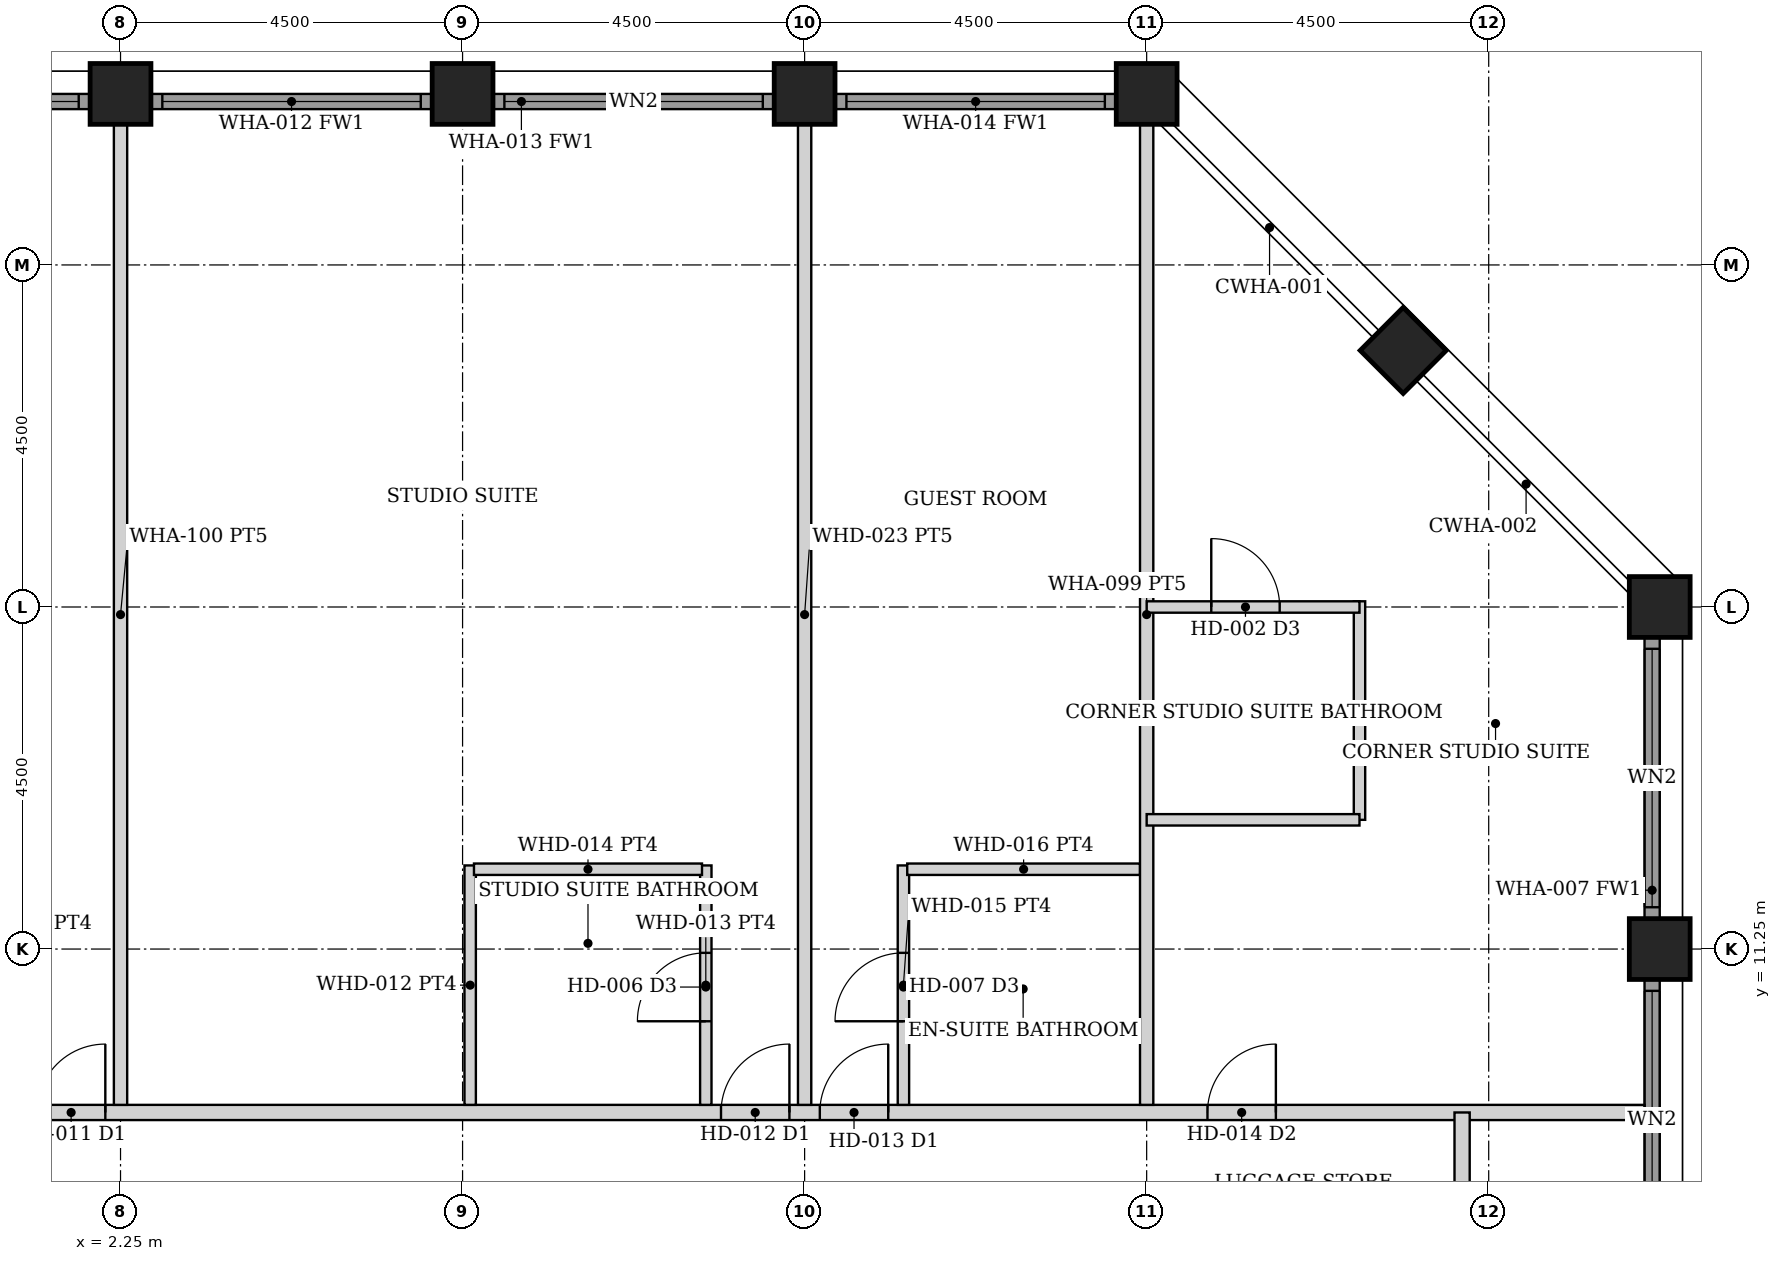
"""IFC4 building model, lengths in metres.
Left out: names, types, materials, properties, quantities, classifications, styles, units other than length and angle.
Written with IfcOpenShell. Run it as: python <this file> out.ifc"""

import sys

from ifc_helpers import new_model, si_unit, direction, frame, frame_2d, origin, origin_2d, place, context, subcontext, project, spatial, rectangle, hollow_rectangle, extrude, element, fill, save


model = new_model("IFC4")
c1 = context("Model", 3, precision=1e-05, world=origin(), true_north=direction((0.0, 1.0)))
c2 = subcontext(c1, "Body", "Model", "MODEL_VIEW")
j1 = project(units=[si_unit("LENGTHUNIT", "METRE"), si_unit("PLANEANGLEUNIT", "RADIAN")], contexts=[c1])
p1 = place(None, origin())
s1 = spatial("IfcSite", under=j1, at=p1, CompositionType="ELEMENT")
p2 = place(p1, origin())
s2 = spatial("IfcBuilding", under=s1, at=p2, CompositionType="ELEMENT")
p3 = place(p2, frame((0.0, 0.0, 150.8)))
s3 = spatial("IfcBuildingStorey", under=s2, at=p3, CompositionType="ELEMENT", Elevation=150.8)
for number, where, z_axis, x_axis in (
    (1, (2.25, 22.5, 0.0), (0.0, 0.0, 1.0), (0.0, 1.0, 0.0)),
    (2, (6.75, 22.5, 0.0), (0.0, 0.0, 1.0), (0.0, 1.0, 0.0)),
    (3, (11.25, 22.5, 0.0), (0.0, 0.0, 1.0), (0.0, 1.0, 0.0)),
    (4, (22.5, 11.25, 0.0), (0.0, 0.0, 1.0), (1.0, 0.0, 0.0)),
    (5, (15.75, 22.5, 0.0), (0.0, 0.0, 1.0), (0.0, 1.0, 0.0)),
    (6, (22.5, 15.75, 0.0), (0.0, 0.0, 1.0), (1.0, 0.0, 0.0)),
    (7, (19.125, 19.125, 0.0), (0.0, 0.0, 1.0), (0.707, 0.707, 0.0)),
):
    element("IfcColumn", number, at=place(p3, frame(where, z_axis=z_axis, x_axis=x_axis)), inside=s3, PredefinedType="COLUMN", context=c2, shape_type="SweptSolid", body=[
        extrude(hollow_rectangle(XDim=0.8, YDim=0.8, WallThickness=0.05, at=origin_2d()), origin(), (0.0, 0.0, 1.0), 3.6),
    ])
p4 = place(p3, frame((22.4, 7.155, 0.0), z_axis=(0.0, 0.0, 1.0), x_axis=(0.0, 1.0, 0.0)))
e8 = element("IfcWall", 8, at=p4, inside=s3, PredefinedType="SOLIDWALL", context=c2, shape_type="SweptSolid", body=[
    extrude(rectangle(XDim=3.69, YDim=0.2, at=frame_2d((1.845, 0.0))), origin(), (0.0, 0.0, 1.0), 2.479),
])
p5 = place(p4, frame((0.145, 0.0, 0.3)))
e9 = element("IfcOpeningElement", 9, at=p5, cuts=e8, PredefinedType="OPENING", context=c2, shape_type="SweptSolid", body=[
    extrude(rectangle(XDim=3.4, YDim=2.029, at=frame_2d((1.7, 1.015))), frame((0.0, 0.11, 0.0), z_axis=(0.0, -1.0, 0.0), x_axis=(1.0, 0.0, 0.0)), (0.0, 0.0, 1.0), 0.22),
])
p6 = place(p3, frame((22.4, 11.655, 0.0), z_axis=(0.0, 0.0, 1.0), x_axis=(0.0, 1.0, 0.0)))
e10 = element("IfcWall", 10, at=p6, inside=s3, PredefinedType="SOLIDWALL", context=c2, shape_type="SweptSolid", body=[
    extrude(rectangle(XDim=3.69, YDim=0.2, at=frame_2d((1.845, 0.0))), origin(), (0.0, 0.0, 1.0), 2.479),
])
p7 = place(p6, frame((0.145, 0.0, 0.3)))
e11 = element("IfcOpeningElement", 11, at=p7, cuts=e10, PredefinedType="OPENING", context=c2, shape_type="SweptSolid", body=[
    extrude(rectangle(XDim=3.4, YDim=2.029, at=frame_2d((1.7, 1.015))), frame((0.0, 0.11, 0.0), z_axis=(0.0, -1.0, 0.0), x_axis=(1.0, 0.0, 0.0)), (0.0, 0.0, 1.0), 0.22),
])
p8 = place(p3, frame((-1.845, 22.4, 0.0), z_axis=(0.0, 0.0, 1.0), x_axis=(1.0, 0.0, 0.0)))
e12 = element("IfcWall", 12, at=p8, inside=s3, PredefinedType="SOLIDWALL", context=c2, shape_type="SweptSolid", body=[
    extrude(rectangle(XDim=3.69, YDim=0.2, at=frame_2d((1.845, 0.0))), origin(), (0.0, 0.0, 1.0), 2.479),
])
p9 = place(p8, frame((0.145, 0.0, 0.3)))
e13 = element("IfcOpeningElement", 13, at=p9, cuts=e12, PredefinedType="OPENING", context=c2, shape_type="SweptSolid", body=[
    extrude(rectangle(XDim=3.4, YDim=2.029, at=frame_2d((1.7, 1.015))), frame((0.0, 0.11, 0.0), z_axis=(0.0, -1.0, 0.0), x_axis=(1.0, 0.0, 0.0)), (0.0, 0.0, 1.0), 0.22),
])
p10 = place(p3, frame((2.655, 22.4, 0.0), z_axis=(0.0, 0.0, 1.0), x_axis=(1.0, 0.0, 0.0)))
e14 = element("IfcWall", 14, at=p10, inside=s3, PredefinedType="SOLIDWALL", context=c2, shape_type="SweptSolid", body=[
    extrude(rectangle(XDim=3.69, YDim=0.2, at=frame_2d((1.845, 0.0))), origin(), (0.0, 0.0, 1.0), 2.479),
])
p11 = place(p10, frame((0.145, 0.0, 0.3)))
e15 = element("IfcOpeningElement", 15, at=p11, cuts=e14, PredefinedType="OPENING", context=c2, shape_type="SweptSolid", body=[
    extrude(rectangle(XDim=3.4, YDim=2.029, at=frame_2d((1.7, 1.015))), frame((0.0, 0.11, 0.0), z_axis=(0.0, -1.0, 0.0), x_axis=(1.0, 0.0, 0.0)), (0.0, 0.0, 1.0), 0.22),
])
p12 = place(p3, frame((7.155, 22.4, 0.0), z_axis=(0.0, 0.0, 1.0), x_axis=(1.0, 0.0, 0.0)))
e16 = element("IfcWall", 16, at=p12, inside=s3, PredefinedType="SOLIDWALL", context=c2, shape_type="SweptSolid", body=[
    extrude(rectangle(XDim=3.69, YDim=0.2, at=frame_2d((1.845, 0.0))), origin(), (0.0, 0.0, 1.0), 2.479),
])
p13 = place(p12, frame((0.145, 0.0, 0.3)))
e17 = element("IfcOpeningElement", 17, at=p13, cuts=e16, PredefinedType="OPENING", context=c2, shape_type="SweptSolid", body=[
    extrude(rectangle(XDim=3.4, YDim=2.029, at=frame_2d((1.7, 1.015))), frame((0.0, 0.11, 0.0), z_axis=(0.0, -1.0, 0.0), x_axis=(1.0, 0.0, 0.0)), (0.0, 0.0, 1.0), 0.22),
])
p14 = place(p3, frame((11.655, 22.4, 0.0), z_axis=(0.0, 0.0, 1.0), x_axis=(1.0, 0.0, 0.0)))
e18 = element("IfcWall", 18, at=p14, inside=s3, PredefinedType="SOLIDWALL", context=c2, shape_type="SweptSolid", body=[
    extrude(rectangle(XDim=3.69, YDim=0.2, at=frame_2d((1.845, 0.0))), origin(), (0.0, 0.0, 1.0), 2.479),
])
p15 = place(p14, frame((0.145, 0.0, 0.3)))
e19 = element("IfcOpeningElement", 19, at=p15, cuts=e18, PredefinedType="OPENING", context=c2, shape_type="SweptSolid", body=[
    extrude(rectangle(XDim=3.4, YDim=2.029, at=frame_2d((1.7, 1.015))), frame((0.0, 0.11, 0.0), z_axis=(0.0, -1.0, 0.0), x_axis=(1.0, 0.0, 0.0)), (0.0, 0.0, 1.0), 0.22),
])
p16 = place(p3, frame((-22.3, 9.1, 0.0), z_axis=(0.0, 0.0, 1.0), x_axis=(1.0, 0.0, 0.0)))
e20 = element("IfcWall", 20, at=p16, inside=s3, PredefinedType="PARTITIONING", context=c2, shape_type="SweptSolid", body=[
    extrude(rectangle(XDim=44.6, YDim=0.2, at=frame_2d((22.3, 0.0))), origin(), (0.0, 0.0, 1.0), 2.473),
])
p17 = place(p16, frame((6.75, 0.0, 0.0)))
e21 = element("IfcOpeningElement", 21, at=p17, cuts=e20, PredefinedType="OPENING", context=c2, shape_type="SweptSolid", body=[
    extrude(rectangle(XDim=0.9, YDim=2.1, at=frame_2d((0.45, 1.05))), frame((0.0, 0.11, 0.0), z_axis=(0.0, -1.0, 0.0), x_axis=(1.0, 0.0, 0.0)), (0.0, 0.0, 1.0), 0.22),
])
p18 = place(p16, frame((11.25, 0.0, 0.0)))
e22 = element("IfcOpeningElement", 22, at=p18, cuts=e20, PredefinedType="OPENING", context=c2, shape_type="SweptSolid", body=[
    extrude(rectangle(XDim=0.9, YDim=2.1, at=frame_2d((0.45, 1.05))), frame((0.0, 0.11, 0.0), z_axis=(0.0, -1.0, 0.0), x_axis=(1.0, 0.0, 0.0)), (0.0, 0.0, 1.0), 0.22),
])
p19 = place(p16, frame((23.45, 0.0, 0.0)))
e23 = element("IfcOpeningElement", 23, at=p19, cuts=e20, PredefinedType="OPENING", context=c2, shape_type="SweptSolid", body=[
    extrude(rectangle(XDim=0.9, YDim=2.1, at=frame_2d((0.45, 1.05))), frame((0.0, 0.11, 0.0), z_axis=(0.0, -1.0, 0.0), x_axis=(1.0, 0.0, 0.0)), (0.0, 0.0, 1.0), 0.22),
])
p20 = place(p16, frame((32.45, 0.0, 0.0)))
e24 = element("IfcOpeningElement", 24, at=p20, cuts=e20, PredefinedType="OPENING", context=c2, shape_type="SweptSolid", body=[
    extrude(rectangle(XDim=0.9, YDim=2.1, at=frame_2d((0.45, 1.05))), frame((0.0, 0.11, 0.0), z_axis=(0.0, -1.0, 0.0), x_axis=(1.0, 0.0, 0.0)), (0.0, 0.0, 1.0), 0.22),
])
p21 = place(p16, frame((33.75, 0.0, 0.0)))
e25 = element("IfcOpeningElement", 25, at=p21, cuts=e20, PredefinedType="OPENING", context=c2, shape_type="SweptSolid", body=[
    extrude(rectangle(XDim=0.9, YDim=2.1, at=frame_2d((0.45, 1.05))), frame((0.0, 0.11, 0.0), z_axis=(0.0, -1.0, 0.0), x_axis=(1.0, 0.0, 0.0)), (0.0, 0.0, 1.0), 0.22),
])
p22 = place(p16, frame((38.85, 0.0, 0.0)))
e26 = element("IfcOpeningElement", 26, at=p22, cuts=e20, PredefinedType="OPENING", context=c2, shape_type="SweptSolid", body=[
    extrude(rectangle(XDim=0.9, YDim=2.1, at=frame_2d((0.45, 1.05))), frame((0.0, 0.11, 0.0), z_axis=(0.0, -1.0, 0.0), x_axis=(1.0, 0.0, 0.0)), (0.0, 0.0, 1.0), 0.22),
])
p23 = place(p16, frame((4.85, 0.0, 0.0)))
e27 = element("IfcOpeningElement", 27, at=p23, cuts=e20, PredefinedType="OPENING", context=c2, shape_type="SweptSolid", body=[
    extrude(rectangle(XDim=0.9, YDim=2.1, at=frame_2d((0.45, 1.05))), frame((0.0, 0.11, 0.0), z_axis=(0.0, -1.0, 0.0), x_axis=(1.0, 0.0, 0.0)), (0.0, 0.0, 1.0), 0.22),
])
p24 = place(p3, frame((19.9, 2.2, 0.0), z_axis=(0.0, 0.0, 1.0), x_axis=(0.0, 1.0, 0.0)))
e28 = element("IfcWall", 28, at=p24, inside=s3, PredefinedType="PARTITIONING", context=c2, shape_type="SweptSolid", body=[
    extrude(rectangle(XDim=6.9, YDim=0.2, at=frame_2d((3.45, 0.0))), origin(), (0.0, 0.0, 1.0), 2.473),
])
p25 = place(p24, frame((2.925, 0.0, 0.0)))
e29 = element("IfcOpeningElement", 29, at=p25, cuts=e28, PredefinedType="OPENING", context=c2, shape_type="SweptSolid", body=[
    extrude(rectangle(XDim=1.0, YDim=2.1, at=frame_2d((0.5, 1.05))), frame((0.0, 0.11, 0.0), z_axis=(0.0, -1.0, 0.0), x_axis=(1.0, 0.0, 0.0)), (0.0, 0.0, 1.0), 0.22),
])
p26 = place(p3, frame((9.95, 9.2, 0.0), z_axis=(0.0, 0.0, 1.0), x_axis=(0.0, 1.0, 0.0)))
e30 = element("IfcWall", 30, at=p26, inside=s3, PredefinedType="PARTITIONING", context=c2, shape_type="SweptSolid", body=[
    extrude(rectangle(XDim=3.15, YDim=0.15, at=frame_2d((1.575, 0.0))), origin(), (0.0, 0.0, 1.0), 2.473),
])
p27 = place(p26, frame((1.1, 0.0, 0.0)))
e31 = element("IfcOpeningElement", 31, at=p27, cuts=e30, PredefinedType="OPENING", context=c2, shape_type="SweptSolid", body=[
    extrude(rectangle(XDim=0.9, YDim=2.1, at=frame_2d((0.45, 1.05))), frame((0.0, 0.085, 0.0), z_axis=(0.0, -1.0, 0.0), x_axis=(1.0, 0.0, 0.0)), (0.0, 0.0, 1.0), 0.17),
])
p28 = place(p3, frame((6.85, 9.2, 0.0), z_axis=(0.0, 0.0, 1.0), x_axis=(0.0, 1.0, 0.0)))
e32 = element("IfcWall", 32, at=p28, inside=s3, PredefinedType="PARTITIONING", context=c2, shape_type="SweptSolid", body=[
    extrude(rectangle(XDim=3.15, YDim=0.15, at=frame_2d((1.575, 0.0))), origin(), (0.0, 0.0, 1.0), 2.473),
])
p29 = place(p3, frame((6.9, 12.3, 0.0), z_axis=(0.0, 0.0, 1.0), x_axis=(1.0, 0.0, 0.0)))
e33 = element("IfcWall", 33, at=p29, inside=s3, PredefinedType="PARTITIONING", context=c2, shape_type="SweptSolid", body=[
    extrude(rectangle(XDim=3.0, YDim=0.15, at=frame_2d((1.5, 0.0))), origin(), (0.0, 0.0, 1.0), 2.473),
])
p30 = place(p3, frame((12.55, 9.2, 0.0), z_axis=(0.0, 0.0, 1.0), x_axis=(0.0, 1.0, 0.0)))
e34 = element("IfcWall", 34, at=p30, inside=s3, PredefinedType="PARTITIONING", context=c2, shape_type="SweptSolid", body=[
    extrude(rectangle(XDim=3.15, YDim=0.15, at=frame_2d((1.575, 0.0))), origin(), (0.0, 0.0, 1.0), 2.473),
])
p31 = place(p30, frame((1.1, 0.0, 0.0)))
e35 = element("IfcOpeningElement", 35, at=p31, cuts=e34, PredefinedType="OPENING", context=c2, shape_type="SweptSolid", body=[
    extrude(rectangle(XDim=0.9, YDim=2.1, at=frame_2d((0.45, 1.05))), frame((0.0, 0.085, 0.0), z_axis=(0.0, -1.0, 0.0), x_axis=(1.0, 0.0, 0.0)), (0.0, 0.0, 1.0), 0.17),
])
p32 = place(p3, frame((12.6, 12.3, 0.0), z_axis=(0.0, 0.0, 1.0), x_axis=(1.0, 0.0, 0.0)))
e36 = element("IfcWall", 36, at=p32, inside=s3, PredefinedType="PARTITIONING", context=c2, shape_type="SweptSolid", body=[
    extrude(rectangle(XDim=3.062, YDim=0.15, at=frame_2d((1.531, 0.0))), origin(), (0.0, 0.0, 1.0), 2.473),
])
for number, where, z_axis, x_axis in (
    (37, (2.25, 9.2, 0.0), (0.0, 0.0, 1.0), (0.0, 1.0, 0.0)),
    (38, (11.25, 9.2, 0.0), (0.0, 0.0, 1.0), (0.0, 1.0, 0.0)),
    (39, (15.75, 9.2, 0.0), (0.0, 0.0, 1.0), (0.0, 1.0, 0.0)),
):
    element("IfcWall", number, at=place(p3, frame(where, z_axis=z_axis, x_axis=x_axis)), inside=s3, PredefinedType="PARTITIONING", context=c2, shape_type="SweptSolid", body=[
        extrude(rectangle(XDim=12.9, YDim=0.175, at=frame_2d((6.45, 0.0))), origin(), (0.0, 0.0, 1.0), 2.473),
    ])
p33 = place(p3, frame((18.55, 12.95, 0.0), z_axis=(0.0, 0.0, 1.0), x_axis=(0.0, 1.0, 0.0)))
e40 = element("IfcWall", 40, at=p33, inside=s3, PredefinedType="PARTITIONING", context=c2, shape_type="SweptSolid", body=[
    extrude(rectangle(XDim=2.875, YDim=0.15, at=frame_2d((1.438, 0.0))), origin(), (0.0, 0.0, 1.0), 2.473),
])
p34 = place(p3, frame((15.75, 12.95, 0.0), z_axis=(0.0, 0.0, 1.0), x_axis=(1.0, 0.0, 0.0)))
e41 = element("IfcWall", 41, at=p34, inside=s3, PredefinedType="PARTITIONING", context=c2, shape_type="SweptSolid", body=[
    extrude(rectangle(XDim=2.8, YDim=0.15, at=frame_2d((1.4, 0.0))), origin(), (0.0, 0.0, 1.0), 2.473),
])
p35 = place(p3, frame((15.75, 15.75, 0.0), z_axis=(0.0, 0.0, 1.0), x_axis=(1.0, 0.0, 0.0)))
e42 = element("IfcWall", 42, at=p35, inside=s3, PredefinedType="PARTITIONING", context=c2, shape_type="SweptSolid", body=[
    extrude(rectangle(XDim=2.8, YDim=0.15, at=frame_2d((1.4, 0.0))), origin(), (0.0, 0.0, 1.0), 2.473),
])
p36 = place(p35, frame((0.85, 0.0, 0.0)))
e43 = element("IfcOpeningElement", 43, at=p36, cuts=e42, PredefinedType="OPENING", context=c2, shape_type="SweptSolid", body=[
    extrude(rectangle(XDim=0.9, YDim=2.1, at=frame_2d((0.45, 1.05))), frame((0.0, 0.085, 0.0), z_axis=(0.0, -1.0, 0.0), x_axis=(1.0, 0.0, 0.0)), (0.0, 0.0, 1.0), 0.17),
])
p37 = place(p5, origin())
e44 = element("IfcWindow", 44, at=p37, inside=s3, PartitioningType="SINGLE_PANEL", PredefinedType="WINDOW", context=c2, shape_type="SweptSolid", body=[
    extrude(rectangle(XDim=3.4, YDim=2.029, at=frame_2d((1.7, 1.015))), frame((0.0, 0.03, 0.0), z_axis=(0.0, -1.0, 0.0), x_axis=(1.0, 0.0, 0.0)), (0.0, 0.0, 1.0), 0.06),
])
fill(e9, e44)
p38 = place(p7, origin())
e45 = element("IfcWindow", 45, at=p38, inside=s3, PartitioningType="SINGLE_PANEL", PredefinedType="WINDOW", context=c2, shape_type="SweptSolid", body=[
    extrude(rectangle(XDim=3.4, YDim=2.029, at=frame_2d((1.7, 1.015))), frame((0.0, 0.03, 0.0), z_axis=(0.0, -1.0, 0.0), x_axis=(1.0, 0.0, 0.0)), (0.0, 0.0, 1.0), 0.06),
])
fill(e11, e45)
p39 = place(p9, origin())
e46 = element("IfcWindow", 46, at=p39, inside=s3, PartitioningType="SINGLE_PANEL", PredefinedType="WINDOW", context=c2, shape_type="SweptSolid", body=[
    extrude(rectangle(XDim=3.4, YDim=2.029, at=frame_2d((1.7, 1.015))), frame((0.0, 0.03, 0.0), z_axis=(0.0, -1.0, 0.0), x_axis=(1.0, 0.0, 0.0)), (0.0, 0.0, 1.0), 0.06),
])
fill(e13, e46)
p40 = place(p11, origin())
e47 = element("IfcWindow", 47, at=p40, inside=s3, PartitioningType="SINGLE_PANEL", PredefinedType="WINDOW", context=c2, shape_type="SweptSolid", body=[
    extrude(rectangle(XDim=3.4, YDim=2.029, at=frame_2d((1.7, 1.015))), frame((0.0, 0.03, 0.0), z_axis=(0.0, -1.0, 0.0), x_axis=(1.0, 0.0, 0.0)), (0.0, 0.0, 1.0), 0.06),
])
fill(e15, e47)
p41 = place(p13, origin())
e48 = element("IfcWindow", 48, at=p41, inside=s3, PartitioningType="SINGLE_PANEL", PredefinedType="WINDOW", context=c2, shape_type="SweptSolid", body=[
    extrude(rectangle(XDim=3.4, YDim=2.029, at=frame_2d((1.7, 1.015))), frame((0.0, 0.03, 0.0), z_axis=(0.0, -1.0, 0.0), x_axis=(1.0, 0.0, 0.0)), (0.0, 0.0, 1.0), 0.06),
])
fill(e17, e48)
p42 = place(p15, origin())
e49 = element("IfcWindow", 49, at=p42, inside=s3, PartitioningType="SINGLE_PANEL", PredefinedType="WINDOW", context=c2, shape_type="SweptSolid", body=[
    extrude(rectangle(XDim=3.4, YDim=2.029, at=frame_2d((1.7, 1.015))), frame((0.0, 0.03, 0.0), z_axis=(0.0, -1.0, 0.0), x_axis=(1.0, 0.0, 0.0)), (0.0, 0.0, 1.0), 0.06),
])
fill(e19, e49)
p43 = place(p19, origin())
e50 = element("IfcDoor", 50, at=p43, inside=s3, OperationType="SINGLE_SWING_RIGHT", PredefinedType="DOOR", context=c2, shape_type="SweptSolid", body=[
    extrude(rectangle(XDim=0.9, YDim=2.1, at=frame_2d((0.45, 1.05))), frame((0.0, 0.025, 0.0), z_axis=(0.0, -1.0, 0.0), x_axis=(1.0, 0.0, 0.0)), (0.0, 0.0, 1.0), 0.05),
])
fill(e23, e50)
p44 = place(p20, origin())
e51 = element("IfcDoor", 51, at=p44, inside=s3, OperationType="SINGLE_SWING_RIGHT", PredefinedType="DOOR", context=c2, shape_type="SweptSolid", body=[
    extrude(rectangle(XDim=0.9, YDim=2.1, at=frame_2d((0.45, 1.05))), frame((0.0, 0.025, 0.0), z_axis=(0.0, -1.0, 0.0), x_axis=(1.0, 0.0, 0.0)), (0.0, 0.0, 1.0), 0.05),
])
fill(e24, e51)
p45 = place(p27, origin())
e52 = element("IfcDoor", 52, at=p45, inside=s3, OperationType="SINGLE_SWING_LEFT", PredefinedType="DOOR", context=c2, shape_type="SweptSolid", body=[
    extrude(rectangle(XDim=0.9, YDim=2.1, at=frame_2d((0.45, 1.05))), frame((0.0, 0.025, 0.0), z_axis=(0.0, -1.0, 0.0), x_axis=(1.0, 0.0, 0.0)), (0.0, 0.0, 1.0), 0.05),
])
fill(e31, e52)
p46 = place(p21, origin())
e53 = element("IfcDoor", 53, at=p46, inside=s3, OperationType="SINGLE_SWING_RIGHT", PredefinedType="DOOR", context=c2, shape_type="SweptSolid", body=[
    extrude(rectangle(XDim=0.9, YDim=2.1, at=frame_2d((0.45, 1.05))), frame((0.0, 0.025, 0.0), z_axis=(0.0, -1.0, 0.0), x_axis=(1.0, 0.0, 0.0)), (0.0, 0.0, 1.0), 0.05),
])
fill(e25, e53)
p47 = place(p31, origin())
e54 = element("IfcDoor", 54, at=p47, inside=s3, OperationType="SINGLE_SWING_LEFT", PredefinedType="DOOR", context=c2, shape_type="SweptSolid", body=[
    extrude(rectangle(XDim=0.9, YDim=2.1, at=frame_2d((0.45, 1.05))), frame((0.0, 0.025, 0.0), z_axis=(0.0, -1.0, 0.0), x_axis=(1.0, 0.0, 0.0)), (0.0, 0.0, 1.0), 0.05),
])
fill(e35, e54)
p48 = place(p22, origin())
e55 = element("IfcDoor", 55, at=p48, inside=s3, OperationType="SINGLE_SWING_RIGHT", PredefinedType="DOOR", context=c2, shape_type="SweptSolid", body=[
    extrude(rectangle(XDim=0.9, YDim=2.1, at=frame_2d((0.45, 1.05))), frame((0.0, 0.025, 0.0), z_axis=(0.0, -1.0, 0.0), x_axis=(1.0, 0.0, 0.0)), (0.0, 0.0, 1.0), 0.05),
])
fill(e26, e55)
p49 = place(p36, origin())
e56 = element("IfcDoor", 56, at=p49, inside=s3, OperationType="SINGLE_SWING_LEFT", PredefinedType="DOOR", context=c2, shape_type="SweptSolid", body=[
    extrude(rectangle(XDim=0.9, YDim=2.1, at=frame_2d((0.45, 1.05))), frame((0.0, 0.025, 0.0), z_axis=(0.0, -1.0, 0.0), x_axis=(1.0, 0.0, 0.0)), (0.0, 0.0, 1.0), 0.05),
])
fill(e43, e56)
save(model, sys.argv[1])
